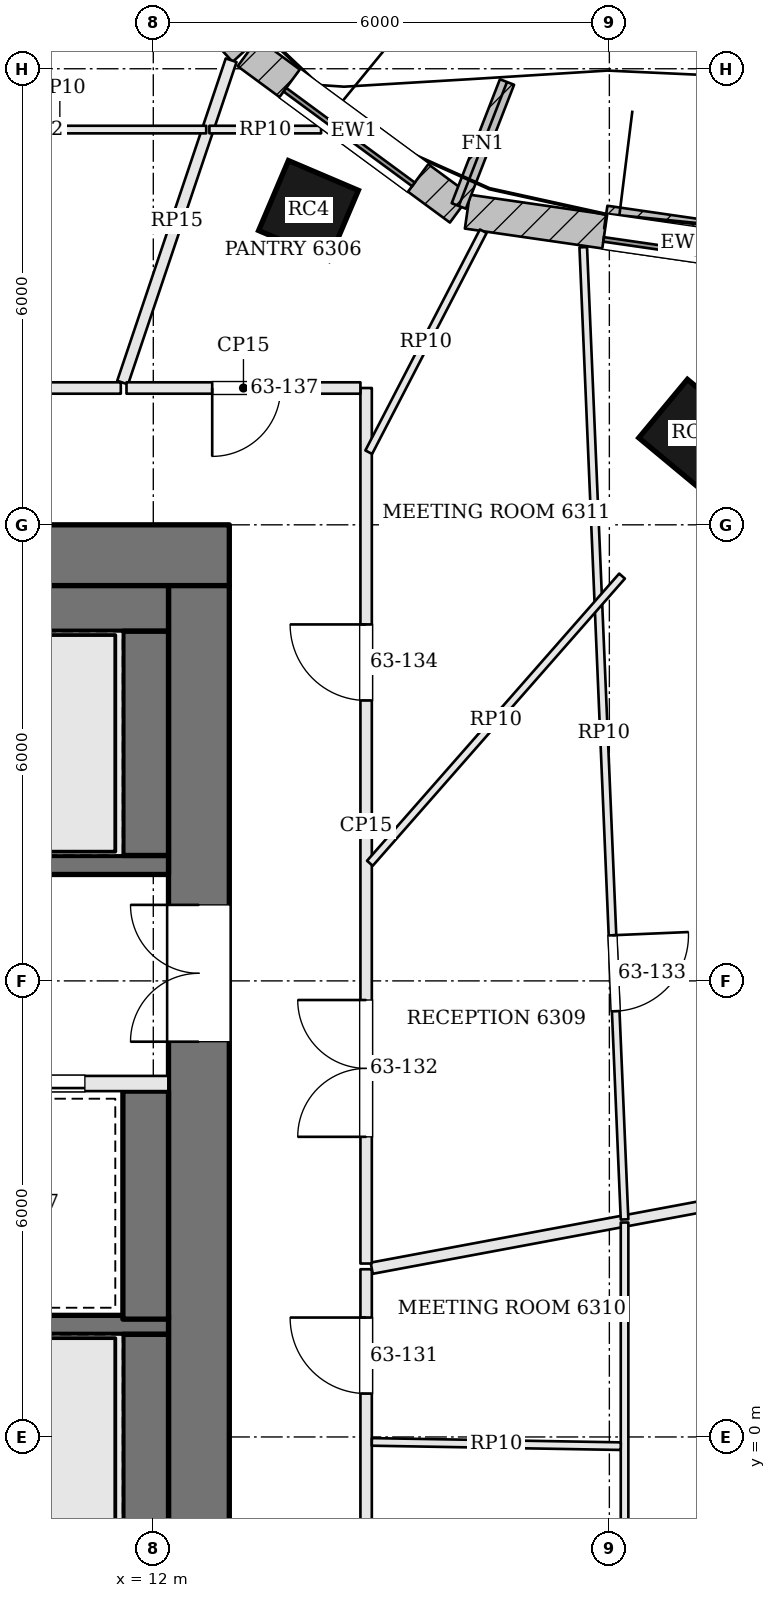
"""IFC4 building model, lengths in metres.
Left out: names, types, materials, properties, quantities, classifications, styles, units other than length and angle.
Written with IfcOpenShell. Run it as: python <this file> out.ifc"""

import sys

from ifc_helpers import new_model, si_unit, direction, frame, frame_2d, origin, origin_2d, place, context, subcontext, project, spatial, rectangle, extrude, element, fill, save


model = new_model("IFC4")
c1 = context("Model", 3, precision=1e-05, world=origin(), true_north=direction((0.0, 1.0)))
c2 = subcontext(c1, "Body", "Model", "MODEL_VIEW")
j1 = project(units=[si_unit("LENGTHUNIT", "METRE"), si_unit("PLANEANGLEUNIT", "RADIAN")], contexts=[c1])
p1 = place(None, origin())
s1 = spatial("IfcSite", under=j1, at=p1, CompositionType="ELEMENT")
p2 = place(p1, origin())
s2 = spatial("IfcBuilding", under=s1, at=p2, CompositionType="ELEMENT")
p3 = place(p2, frame((0.0, 0.0, 256.5)))
s3 = spatial("IfcBuildingStorey", under=s2, at=p3, CompositionType="ELEMENT", Elevation=256.5)
p4 = place(p3, frame((-13.0, 11.6, 0.0), z_axis=(0.0, 0.0, 1.0), x_axis=(1.0, 0.0, 0.0)))
e1 = element("IfcWall", 1, at=p4, inside=s3, PredefinedType="SHEAR", context=c2, shape_type="SweptSolid", body=[
    extrude(rectangle(XDim=26.0, YDim=0.8, at=frame_2d((13.0, 0.0))), origin(), (0.0, 0.0, 1.0), 3.9),
])
p5 = place(p4, frame((8.825, 0.0, 0.0)))
e2 = element("IfcOpeningElement", 2, at=p5, cuts=e1, PredefinedType="OPENING", context=c2, shape_type="SweptSolid", body=[
    extrude(rectangle(XDim=1.0, YDim=2.1, at=frame_2d((0.5, 1.05))), frame((0.0, 0.41, 0.0), z_axis=(0.0, -1.0, 0.0), x_axis=(1.0, 0.0, 0.0)), (0.0, 0.0, 1.0), 0.82),
])
p6 = place(p4, frame((11.825, 0.0, 0.0)))
e3 = element("IfcOpeningElement", 3, at=p6, cuts=e1, PredefinedType="OPENING", context=c2, shape_type="SweptSolid", body=[
    extrude(rectangle(XDim=0.7, YDim=2.1, at=frame_2d((0.35, 1.05))), frame((0.0, 0.41, 0.0), z_axis=(0.0, -1.0, 0.0), x_axis=(1.0, 0.0, 0.0)), (0.0, 0.0, 1.0), 0.82),
])
p7 = place(p4, frame((14.275, 0.0, 0.0)))
e4 = element("IfcOpeningElement", 4, at=p7, cuts=e1, PredefinedType="OPENING", context=c2, shape_type="SweptSolid", body=[
    extrude(rectangle(XDim=0.7, YDim=2.1, at=frame_2d((0.35, 1.05))), frame((0.0, 0.41, 0.0), z_axis=(0.0, -1.0, 0.0), x_axis=(1.0, 0.0, 0.0)), (0.0, 0.0, 1.0), 0.82),
])
p8 = place(p4, frame((16.175, 0.0, 0.0)))
e5 = element("IfcOpeningElement", 5, at=p8, cuts=e1, PredefinedType="OPENING", context=c2, shape_type="SweptSolid", body=[
    extrude(rectangle(XDim=1.0, YDim=2.1, at=frame_2d((0.5, 1.05))), frame((0.0, 0.41, 0.0), z_axis=(0.0, -1.0, 0.0), x_axis=(1.0, 0.0, 0.0)), (0.0, 0.0, 1.0), 0.82),
])
p9 = place(p3, frame((12.6, -2.2, 0.0), z_axis=(0.0, 0.0, 1.0), x_axis=(0.0, 1.0, 0.0)))
e6 = element("IfcWall", 6, at=p9, inside=s3, PredefinedType="SHEAR", context=c2, shape_type="SweptSolid", body=[
    extrude(rectangle(XDim=13.4, YDim=0.8, at=frame_2d((6.7, 0.0))), origin(), (0.0, 0.0, 1.0), 3.9),
])
p10 = place(p9, frame((7.4, 0.0, 0.0)))
e7 = element("IfcOpeningElement", 7, at=p10, cuts=e6, PredefinedType="OPENING", context=c2, shape_type="SweptSolid", body=[
    extrude(rectangle(XDim=1.8, YDim=2.1, at=frame_2d((0.9, 1.05))), frame((0.0, 0.41, 0.0), z_axis=(0.0, -1.0, 0.0), x_axis=(1.0, 0.0, 0.0)), (0.0, 0.0, 1.0), 0.82),
])
for number, where, z_axis, x_axis in (
    (8, (19.092, 13.209, 0.0), (0.0, 0.0, 1.0), (-0.769, 0.639, 0.0)),
    (9, (14.042, 16.136, 0.0), (0.0, 0.0, 1.0), (-0.92, 0.392, 0.0)),
):
    element("IfcColumn", number, at=place(p3, frame(where, z_axis=z_axis, x_axis=x_axis)), inside=s3, PredefinedType="COLUMN", context=c2, shape_type="SweptSolid", body=[
        extrude(rectangle(XDim=1.0, YDim=1.0, at=origin_2d()), origin(), (0.0, 0.0, 1.0), 3.9),
    ])
p11 = place(p3, frame((21.825, 15.297, 0.0), z_axis=(0.0, 0.0, 1.0), x_axis=(-0.98971474215, 0.143054986527, 0.0)))
e10 = element("IfcWall", 10, at=p11, inside=s3, PredefinedType="SOLIDWALL", context=c2, shape_type="SweptSolid", body=[
    extrude(rectangle(XDim=5.753, YDim=0.45, at=frame_2d((2.876, 0.0))), origin(), (0.0, 0.0, 1.0), 3.7),
])
p12 = place(p11, frame((1.826, 0.0, 0.9)))
e11 = element("IfcOpeningElement", 11, at=p12, cuts=e10, PredefinedType="OPENING", context=c2, shape_type="SweptSolid", body=[
    extrude(rectangle(XDim=2.1, YDim=2.3, at=frame_2d((1.05, 1.15))), frame((0.0, 0.235, 0.0), z_axis=(0.0, -1.0, 0.0), x_axis=(1.0, 0.0, 0.0)), (0.0, 0.0, 1.0), 0.47),
])
p13 = place(p3, frame((16.036, 16.158, 0.0), z_axis=(0.0, 0.0, 1.0), x_axis=(-0.805181432967, 0.593028549064, 0.0)))
e12 = element("IfcWall", 12, at=p13, inside=s3, PredefinedType="SOLIDWALL", context=c2, shape_type="SweptSolid", body=[
    extrude(rectangle(XDim=3.469, YDim=0.45, at=frame_2d((1.734, 0.0))), origin(), (0.0, 0.0, 1.0), 3.7),
])
p14 = place(p13, frame((0.684, 0.0, 0.9)))
e13 = element("IfcOpeningElement", 13, at=p14, cuts=e12, PredefinedType="OPENING", context=c2, shape_type="SweptSolid", body=[
    extrude(rectangle(XDim=2.1, YDim=2.3, at=frame_2d((1.05, 1.15))), frame((0.0, 0.235, 0.0), z_axis=(0.0, -1.0, 0.0), x_axis=(1.0, 0.0, 0.0)), (0.0, 0.0, 1.0), 0.47),
])
p15 = place(p3, frame((13.209, 18.243, 0.0), z_axis=(0.0, 0.0, 1.0), x_axis=(-0.677612152497, 0.735419452278, 0.0)))
e14 = element("IfcWall", 14, at=p15, inside=s3, PredefinedType="SOLIDWALL", context=c2, shape_type="SweptSolid", body=[
    extrude(rectangle(XDim=3.797, YDim=0.45, at=frame_2d((1.898, 0.0))), origin(), (0.0, 0.0, 1.0), 3.7),
])
p16 = place(p15, frame((0.848, 0.0, 0.9)))
e15 = element("IfcOpeningElement", 15, at=p16, cuts=e14, PredefinedType="OPENING", context=c2, shape_type="SweptSolid", body=[
    extrude(rectangle(XDim=2.1, YDim=2.3, at=frame_2d((1.05, 1.15))), frame((0.0, 0.235, 0.0), z_axis=(0.0, -1.0, 0.0), x_axis=(1.0, 0.0, 0.0)), (0.0, 0.0, 1.0), 0.47),
])
p17 = place(p3, frame((16.019, 16.195, 0.0), z_axis=(0.0, 0.0, 1.0), x_axis=(0.362641522028, 0.931928713208, 0.0)))
e16 = element("IfcWall", 16, at=p17, inside=s3, PredefinedType="SOLIDWALL", context=c2, shape_type="SweptSolid", body=[
    extrude(rectangle(XDim=1.75, YDim=0.2, at=frame_2d((0.875, 0.0))), origin(), (0.0, 0.0, 1.0), 3.7),
])
p18 = place(p3, frame((21.471, 15.541, 3.9), z_axis=(0.0, 0.0, 1.0), x_axis=(-0.989713234374, 0.143065417571, 0.0)))
e17 = element("IfcWall", 17, at=p18, inside=s3, PredefinedType="PARAPET", context=c2, shape_type="SweptSolid", body=[
    extrude(rectangle(XDim=3.555, YDim=0.3, at=frame_2d((1.777, 0.0))), origin(), (0.0, 0.0, 1.0), 1.1),
])
p19 = place(p3, frame((12.2, 7.525, 0.0), z_axis=(0.0, 0.0, 1.0), x_axis=(-1.0, 0.0, 0.0)))
e18 = element("IfcWall", 18, at=p19, inside=s3, PredefinedType="SOLIDWALL", context=c2, shape_type="SweptSolid", body=[
    extrude(rectangle(XDim=7.1, YDim=0.25, at=frame_2d((3.55, 0.0))), origin(), (0.0, 0.0, 1.0), 3.7),
])
p20 = place(p19, frame((5.8, 0.0, 0.0)))
e19 = element("IfcOpeningElement", 19, at=p20, cuts=e18, PredefinedType="OPENING", context=c2, shape_type="SweptSolid", body=[
    extrude(rectangle(XDim=1.2, YDim=2.1, at=frame_2d((0.6, 1.05))), frame((0.0, 0.135, 0.0), z_axis=(0.0, -1.0, 0.0), x_axis=(1.0, 0.0, 0.0)), (0.0, 0.0, 1.0), 0.27),
])
p21 = place(p3, frame((12.2, 4.65, 0.0), z_axis=(0.0, 0.0, 1.0), x_axis=(-1.0, 0.0, 0.0)))
e20 = element("IfcWall", 20, at=p21, inside=s3, PredefinedType="SOLIDWALL", context=c2, shape_type="SweptSolid", body=[
    extrude(rectangle(XDim=7.1, YDim=0.2, at=frame_2d((3.55, 0.0))), origin(), (0.0, 0.0, 1.0), 3.7),
])
p22 = place(p21, frame((4.4, 0.0, 0.0)))
e21 = element("IfcOpeningElement", 21, at=p22, cuts=e20, PredefinedType="OPENING", context=c2, shape_type="SweptSolid", body=[
    extrude(rectangle(XDim=1.2, YDim=2.1, at=frame_2d((0.6, 1.05))), frame((0.0, 0.11, 0.0), z_axis=(0.0, -1.0, 0.0), x_axis=(1.0, 0.0, 0.0)), (0.0, 0.0, 1.0), 0.22),
])
p23 = place(p21, frame((1.1, 0.0, 0.0)))
e22 = element("IfcOpeningElement", 22, at=p23, cuts=e20, PredefinedType="OPENING", context=c2, shape_type="SweptSolid", body=[
    extrude(rectangle(XDim=1.2, YDim=2.1, at=frame_2d((0.6, 1.05))), frame((0.0, 0.11, 0.0), z_axis=(0.0, -1.0, 0.0), x_axis=(1.0, 0.0, 0.0)), (0.0, 0.0, 1.0), 0.22),
])
p24 = place(p3, frame((12.2, 1.475, 0.0), z_axis=(0.0, 0.0, 1.0), x_axis=(-1.0, 0.0, 0.0)))
e23 = element("IfcWall", 23, at=p24, inside=s3, PredefinedType="SOLIDWALL", context=c2, shape_type="SweptSolid", body=[
    extrude(rectangle(XDim=7.1, YDim=0.25, at=frame_2d((3.55, 0.0))), origin(), (0.0, 0.0, 1.0), 3.7),
])
p25 = place(p24, frame((5.8, 0.0, 0.0)))
e24 = element("IfcOpeningElement", 24, at=p25, cuts=e23, PredefinedType="OPENING", context=c2, shape_type="SweptSolid", body=[
    extrude(rectangle(XDim=1.2, YDim=2.1, at=frame_2d((0.6, 1.05))), frame((0.0, 0.135, 0.0), z_axis=(0.0, -1.0, 0.0), x_axis=(1.0, 0.0, 0.0)), (0.0, 0.0, 1.0), 0.27),
])
p26 = place(p3, frame((12.2, 10.9, 0.0), z_axis=(0.0, 0.0, 1.0), x_axis=(-1.0, 0.0, 0.0)))
e25 = element("IfcWall", 25, at=p26, inside=s3, PredefinedType="SOLIDWALL", context=c2, shape_type="SweptSolid", body=[
    extrude(rectangle(XDim=7.1, YDim=0.6, at=frame_2d((3.55, 0.0))), origin(), (0.0, 0.0, 1.0), 3.7),
])
p27 = place(p3, frame((11.9, 10.6, 0.0), z_axis=(0.0, 0.0, 1.0), x_axis=(0.0, -1.0, 0.0)))
e26 = element("IfcWall", 26, at=p27, inside=s3, PredefinedType="SOLIDWALL", context=c2, shape_type="SweptSolid", body=[
    extrude(rectangle(XDim=2.95, YDim=0.6, at=frame_2d((1.475, 0.0))), origin(), (0.0, 0.0, 1.0), 3.7),
])
p28 = place(p3, frame((11.9, 4.55, 0.0), z_axis=(0.0, 0.0, 1.0), x_axis=(0.0, -1.0, 0.0)))
e27 = element("IfcWall", 27, at=p28, inside=s3, PredefinedType="SOLIDWALL", context=c2, shape_type="SweptSolid", body=[
    extrude(rectangle(XDim=3.0, YDim=0.6, at=frame_2d((1.5, 0.0))), origin(), (0.0, 0.0, 1.0), 3.7),
])
p29 = place(p3, frame((11.9, 1.35, 0.0), z_axis=(0.0, 0.0, 1.0), x_axis=(0.0, -1.0, 0.0)))
e28 = element("IfcWall", 28, at=p29, inside=s3, PredefinedType="SOLIDWALL", context=c2, shape_type="SweptSolid", body=[
    extrude(rectangle(XDim=2.95, YDim=0.6, at=frame_2d((1.475, 0.0))), origin(), (0.0, 0.0, 1.0), 3.7),
])
p30 = place(p3, frame((11.573, 13.8, 0.0), z_axis=(0.0, 0.0, 1.0), x_axis=(-1.0, 0.0, 0.0)))
e29 = element("IfcWall", 29, at=p30, inside=s3, PredefinedType="PARTITIONING", context=c2, shape_type="SweptSolid", body=[
    extrude(rectangle(XDim=11.373, YDim=0.15, at=frame_2d((5.687, 0.0))), origin(), (0.0, 0.0, 1.0), 3.084),
])
p31 = place(p30, frame((1.79, 0.0, 0.0)))
e30 = element("IfcOpeningElement", 30, at=p31, cuts=e29, PredefinedType="OPENING", context=c2, shape_type="SweptSolid", body=[
    extrude(rectangle(XDim=1.8, YDim=2.1, at=frame_2d((0.9, 1.05))), frame((0.0, 0.085, 0.0), z_axis=(0.0, -1.0, 0.0), x_axis=(1.0, 0.0, 0.0)), (0.0, 0.0, 1.0), 0.17),
])
p32 = place(p30, frame((6.36, 0.0, 0.0)))
e31 = element("IfcOpeningElement", 31, at=p32, cuts=e29, PredefinedType="OPENING", context=c2, shape_type="SweptSolid", body=[
    extrude(rectangle(XDim=1.0, YDim=2.4, at=frame_2d((0.5, 1.2))), frame((0.0, 0.085, 0.0), z_axis=(0.0, -1.0, 0.0), x_axis=(1.0, 0.0, 0.0)), (0.0, 0.0, 1.0), 0.17),
])
p33 = place(p3, frame((13.024, 18.112, 0.0), z_axis=(0.0, 0.0, 1.0), x_axis=(-0.319057942095, -0.947735210692, 0.0)))
e32 = element("IfcWall", 32, at=p33, inside=s3, PredefinedType="PARTITIONING", context=c2, shape_type="SweptSolid", body=[
    extrude(rectangle(XDim=4.475, YDim=0.15, at=frame_2d((2.237, 0.0))), origin(), (0.0, 0.0, 1.0), 3.084),
])
p34 = place(p3, frame((14.8, -4.725, 0.0), z_axis=(0.0, 0.0, 1.0), x_axis=(0.0, 1.0, 0.0)))
e33 = element("IfcWall", 33, at=p34, inside=s3, PredefinedType="PARTITIONING", context=c2, shape_type="SweptSolid", body=[
    extrude(rectangle(XDim=6.932, YDim=0.15, at=frame_2d((3.466, 0.0))), origin(), (0.0, 0.0, 1.0), 3.084),
])
p35 = place(p34, frame((2.377, 0.0, 0.0)))
e34 = element("IfcOpeningElement", 34, at=p35, cuts=e33, PredefinedType="OPENING", context=c2, shape_type="SweptSolid", body=[
    extrude(rectangle(XDim=1.0, YDim=2.4, at=frame_2d((0.5, 1.2))), frame((0.0, 0.085, 0.0), z_axis=(0.0, -1.0, 0.0), x_axis=(1.0, 0.0, 0.0)), (0.0, 0.0, 1.0), 0.17),
])
p36 = place(p34, frame((5.296, 0.0, 0.0)))
e35 = element("IfcOpeningElement", 35, at=p36, cuts=e33, PredefinedType="OPENING", context=c2, shape_type="SweptSolid", body=[
    extrude(rectangle(XDim=1.0, YDim=2.4, at=frame_2d((0.5, 1.2))), frame((0.0, 0.085, 0.0), z_axis=(0.0, -1.0, 0.0), x_axis=(1.0, 0.0, 0.0)), (0.0, 0.0, 1.0), 0.17),
])
p37 = place(p3, frame((25.467, 4.199, 0.0), z_axis=(0.0, 0.0, 1.0), x_axis=(-0.982996865326, -0.183622337308, 0.0)))
e36 = element("IfcWall", 36, at=p37, inside=s3, PredefinedType="PARTITIONING", context=c2, shape_type="SweptSolid", body=[
    extrude(rectangle(XDim=10.776, YDim=0.15, at=frame_2d((5.388, 0.0))), origin(), (0.0, 0.0, 1.0), 3.084),
])
p38 = place(p3, frame((14.8, 2.281, 0.0), z_axis=(0.0, 0.0, 1.0), x_axis=(0.0, 1.0, 0.0)))
e37 = element("IfcWall", 37, at=p38, inside=s3, PredefinedType="PARTITIONING", context=c2, shape_type="SweptSolid", body=[
    extrude(rectangle(XDim=11.519, YDim=0.15, at=frame_2d((5.759, 0.0))), origin(), (0.0, 0.0, 1.0), 3.084),
])
p39 = place(p38, frame((1.667, 0.0, 0.0)))
e38 = element("IfcOpeningElement", 38, at=p39, cuts=e37, PredefinedType="OPENING", context=c2, shape_type="SweptSolid", body=[
    extrude(rectangle(XDim=1.8, YDim=2.1, at=frame_2d((0.9, 1.05))), frame((0.0, 0.085, 0.0), z_axis=(0.0, -1.0, 0.0), x_axis=(1.0, 0.0, 0.0)), (0.0, 0.0, 1.0), 0.17),
])
p40 = place(p38, frame((7.408, 0.0, 0.0)))
e39 = element("IfcOpeningElement", 39, at=p40, cuts=e37, PredefinedType="OPENING", context=c2, shape_type="SweptSolid", body=[
    extrude(rectangle(XDim=1.0, YDim=2.4, at=frame_2d((0.5, 1.2))), frame((0.0, 0.085, 0.0), z_axis=(0.0, -1.0, 0.0), x_axis=(1.0, 0.0, 0.0)), (0.0, 0.0, 1.0), 0.17),
])
p41 = place(p3, frame((14.725, 13.8, 0.0), z_axis=(0.0, 0.0, 1.0), x_axis=(-1.0, 0.0, 0.0)))
e40 = element("IfcWall", 40, at=p41, inside=s3, PredefinedType="PARTITIONING", context=c2, shape_type="SweptSolid", body=[
    extrude(rectangle(XDim=3.078, YDim=0.15, at=frame_2d((1.539, 0.0))), origin(), (0.0, 0.0, 1.0), 3.084),
])
p42 = place(p41, frame((1.05, 0.0, 0.0)))
e41 = element("IfcOpeningElement", 41, at=p42, cuts=e40, PredefinedType="OPENING", context=c2, shape_type="SweptSolid", body=[
    extrude(rectangle(XDim=0.9, YDim=2.1, at=frame_2d((0.45, 1.05))), frame((0.0, 0.085, 0.0), z_axis=(0.0, -1.0, 0.0), x_axis=(1.0, 0.0, 0.0)), (0.0, 0.0, 1.0), 0.17),
])
p43 = place(p3, frame((8.845, 17.2, 0.0), z_axis=(0.0, 0.0, 1.0), x_axis=(1.0, 0.0, 0.0)))
e42 = element("IfcWall", 42, at=p43, inside=s3, PredefinedType="PARTITIONING", context=c2, shape_type="SweptSolid", body=[
    extrude(rectangle(XDim=3.851, YDim=0.1, at=frame_2d((1.925, 0.0))), origin(), (0.0, 0.0, 1.0), 3.084),
])
p44 = place(p43, frame((0.533, 0.0, 0.0)))
e43 = element("IfcOpeningElement", 43, at=p44, cuts=e42, PredefinedType="OPENING", context=c2, shape_type="SweptSolid", body=[
    extrude(rectangle(XDim=1.0, YDim=2.1, at=frame_2d((0.5, 1.05))), frame((0.0, 0.06, 0.0), z_axis=(0.0, -1.0, 0.0), x_axis=(1.0, 0.0, 0.0)), (0.0, 0.0, 1.0), 0.12),
])
p45 = place(p3, frame((18.2, 2.821, 0.0), z_axis=(0.0, 0.0, 1.0), x_axis=(0.0, -1.0, 0.0)))
e44 = element("IfcWall", 44, at=p45, inside=s3, PredefinedType="PARTITIONING", context=c2, shape_type="SweptSolid", body=[
    extrude(rectangle(XDim=11.021, YDim=0.1, at=frame_2d((5.511, 0.0))), origin(), (0.0, 0.0, 1.0), 3.084),
])
p46 = place(p3, frame((14.875, -0.065, 0.0), z_axis=(0.0, 0.0, 1.0), x_axis=(0.999854310099, -0.017069228941, 0.0)))
e45 = element("IfcWall", 45, at=p46, inside=s3, PredefinedType="PARTITIONING", context=c2, shape_type="SweptSolid", body=[
    extrude(rectangle(XDim=3.275, YDim=0.1, at=frame_2d((1.638, 0.0))), origin(), (0.0, 0.0, 1.0), 3.084),
])
p47 = place(p3, frame((12.738, 17.2, 0.0), z_axis=(0.0, 0.0, 1.0), x_axis=(1.0, 0.0, 0.0)))
e46 = element("IfcWall", 46, at=p47, inside=s3, PredefinedType="PARTITIONING", context=c2, shape_type="SweptSolid", body=[
    extrude(rectangle(XDim=1.469, YDim=0.1, at=frame_2d((0.735, 0.0))), origin(), (0.0, 0.0, 1.0), 3.084),
])
p48 = place(p3, frame((17.656, 15.652, 0.0), z_axis=(0.0, 0.0, 1.0), x_axis=(0.042451532229, -0.999098527379, 0.0)))
e47 = element("IfcWall", 47, at=p48, inside=s3, PredefinedType="PARTITIONING", context=c2, shape_type="SweptSolid", body=[
    extrude(rectangle(XDim=12.802, YDim=0.1, at=frame_2d((6.401, 0.0))), origin(), (0.0, 0.0, 1.0), 3.084),
])
p49 = place(p48, frame((9.06, 0.0, 0.0)))
e48 = element("IfcOpeningElement", 48, at=p49, cuts=e47, PredefinedType="OPENING", context=c2, shape_type="SweptSolid", body=[
    extrude(rectangle(XDim=1.0, YDim=2.1, at=frame_2d((0.5, 1.05))), frame((0.0, 0.06, 0.0), z_axis=(0.0, -1.0, 0.0), x_axis=(1.0, 0.0, 0.0)), (0.0, 0.0, 1.0), 0.12),
])
p50 = place(p3, frame((14.85, 7.547, 0.0), z_axis=(0.0, 0.0, 1.0), x_axis=(0.659758375042, 0.751477801776, 0.0)))
e49 = element("IfcWall", 49, at=p50, inside=s3, PredefinedType="PARTITIONING", context=c2, shape_type="SweptSolid", body=[
    extrude(rectangle(XDim=5.028, YDim=0.1, at=frame_2d((2.514, 0.0))), origin(), (0.0, 0.0, 1.0), 3.084),
])
p51 = place(p3, frame((14.834, 12.956, 0.0), z_axis=(0.0, 0.0, 1.0), x_axis=(0.460140859441, 0.887845926652, 0.0)))
e50 = element("IfcWall", 50, at=p51, inside=s3, PredefinedType="PARTITIONING", context=c2, shape_type="SweptSolid", body=[
    extrude(rectangle(XDim=3.274, YDim=0.1, at=frame_2d((1.637, 0.0))), origin(), (0.0, 0.0, 1.0), 3.084),
])
p52 = place(p12, origin())
e51 = element("IfcWindow", 51, at=p52, inside=s3, PartitioningType="SINGLE_PANEL", PredefinedType="WINDOW", context=c2, shape_type="SweptSolid", body=[
    extrude(rectangle(XDim=2.1, YDim=2.3, at=frame_2d((1.05, 1.15))), frame((0.0, 0.135, 0.0), z_axis=(0.0, -1.0, 0.0), x_axis=(1.0, 0.0, 0.0)), (0.0, 0.0, 1.0), 0.06),
])
fill(e11, e51)
p53 = place(p14, origin())
e52 = element("IfcWindow", 52, at=p53, inside=s3, PartitioningType="SINGLE_PANEL", PredefinedType="WINDOW", context=c2, shape_type="SweptSolid", body=[
    extrude(rectangle(XDim=2.1, YDim=2.3, at=frame_2d((1.05, 1.15))), frame((0.0, 0.135, 0.0), z_axis=(0.0, -1.0, 0.0), x_axis=(1.0, 0.0, 0.0)), (0.0, 0.0, 1.0), 0.06),
])
fill(e13, e52)
p54 = place(p10, origin())
e53 = element("IfcDoor", 53, at=p54, inside=s3, OperationType="DOUBLE_DOOR_SINGLE_SWING", PredefinedType="DOOR", context=c2, shape_type="SweptSolid", body=[
    extrude(rectangle(XDim=1.8, YDim=2.1, at=frame_2d((0.9, 1.05))), frame((0.0, 0.025, 0.0), z_axis=(0.0, -1.0, 0.0), x_axis=(1.0, 0.0, 0.0)), (0.0, 0.0, 1.0), 0.05),
])
fill(e7, e53)
p55 = place(p23, origin())
e54 = element("IfcDoor", 54, at=p55, inside=s3, OperationType="SLIDING_TO_RIGHT", PredefinedType="DOOR", context=c2, shape_type="SweptSolid", body=[
    extrude(rectangle(XDim=1.2, YDim=2.1, at=frame_2d((0.6, 1.05))), frame((0.0, 0.025, 0.0), z_axis=(0.0, -1.0, 0.0), x_axis=(1.0, 0.0, 0.0)), (0.0, 0.0, 1.0), 0.05),
])
fill(e22, e54)
p56 = place(p36, origin())
e55 = element("IfcDoor", 55, at=p56, inside=s3, OperationType="SINGLE_SWING_RIGHT", PredefinedType="DOOR", context=c2, shape_type="SweptSolid", body=[
    extrude(rectangle(XDim=1.0, YDim=2.4, at=frame_2d((0.5, 1.2))), frame((0.0, 0.025, 0.0), z_axis=(0.0, -1.0, 0.0), x_axis=(1.0, 0.0, 0.0)), (0.0, 0.0, 1.0), 0.05),
])
fill(e35, e55)
p57 = place(p39, origin())
e56 = element("IfcDoor", 56, at=p57, inside=s3, OperationType="DOUBLE_DOOR_SINGLE_SWING", PredefinedType="DOOR", context=c2, shape_type="SweptSolid", body=[
    extrude(rectangle(XDim=1.8, YDim=2.1, at=frame_2d((0.9, 1.05))), frame((0.0, 0.025, 0.0), z_axis=(0.0, -1.0, 0.0), x_axis=(1.0, 0.0, 0.0)), (0.0, 0.0, 1.0), 0.05),
])
fill(e38, e56)
p58 = place(p49, origin())
e57 = element("IfcDoor", 57, at=p58, inside=s3, OperationType="SINGLE_SWING_LEFT", PredefinedType="DOOR", context=c2, shape_type="SweptSolid", body=[
    extrude(rectangle(XDim=1.0, YDim=2.1, at=frame_2d((0.5, 1.05))), frame((0.0, 0.025, 0.0), z_axis=(0.0, -1.0, 0.0), x_axis=(1.0, 0.0, 0.0)), (0.0, 0.0, 1.0), 0.05),
])
fill(e48, e57)
p59 = place(p40, origin())
e58 = element("IfcDoor", 58, at=p59, inside=s3, OperationType="SINGLE_SWING_RIGHT", PredefinedType="DOOR", context=c2, shape_type="SweptSolid", body=[
    extrude(rectangle(XDim=1.0, YDim=2.4, at=frame_2d((0.5, 1.2))), frame((0.0, 0.025, 0.0), z_axis=(0.0, -1.0, 0.0), x_axis=(1.0, 0.0, 0.0)), (0.0, 0.0, 1.0), 0.05),
])
fill(e39, e58)
p60 = place(p42, origin())
e59 = element("IfcDoor", 59, at=p60, inside=s3, OperationType="SINGLE_SWING_RIGHT", PredefinedType="DOOR", context=c2, shape_type="SweptSolid", body=[
    extrude(rectangle(XDim=0.9, YDim=2.1, at=frame_2d((0.45, 1.05))), frame((0.0, 0.025, 0.0), z_axis=(0.0, -1.0, 0.0), x_axis=(1.0, 0.0, 0.0)), (0.0, 0.0, 1.0), 0.05),
])
fill(e41, e59)
save(model, sys.argv[1])
